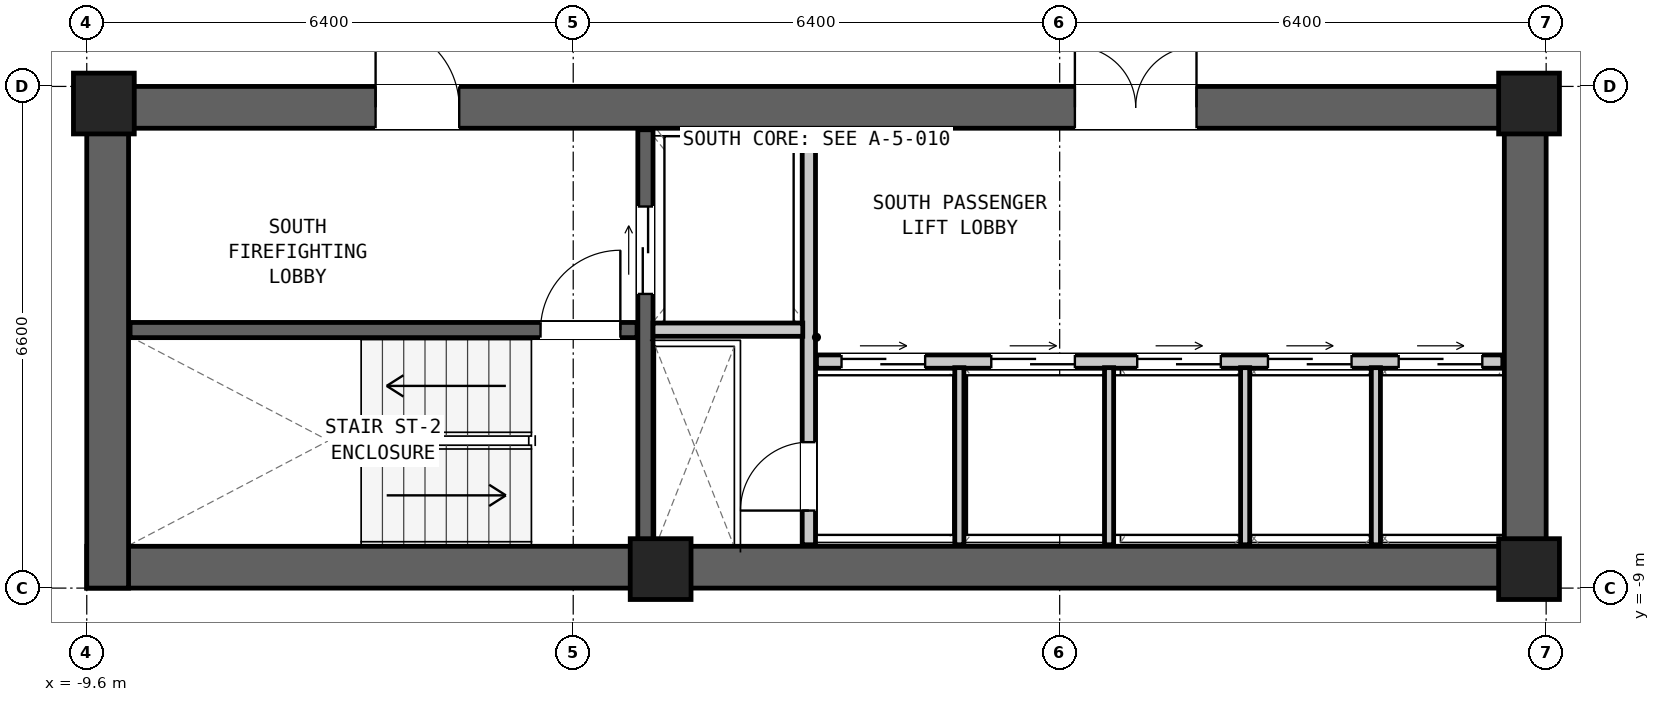
"""IFC4 building model, lengths in metres.
Left out: names, types, materials, properties, quantities, classifications, styles, units other than length and angle.
Written with IfcOpenShell. Run it as: python <this file> out.ifc"""

import sys

from ifc_helpers import new_model, si_unit, direction, frame, frame_2d, origin, origin_2d, place, context, subcontext, project, spatial, rectangle, extrude, element, fill, save


model = new_model("IFC4")
c1 = context("Model", 3, precision=1e-05, world=origin(), true_north=direction((0.0, 1.0)))
c2 = subcontext(c1, "Body", "Model", "MODEL_VIEW")
j1 = project(units=[si_unit("LENGTHUNIT", "METRE"), si_unit("PLANEANGLEUNIT", "RADIAN")], contexts=[c1])
p1 = place(None, origin())
s1 = spatial("IfcSite", under=j1, at=p1, CompositionType="ELEMENT")
p2 = place(p1, origin())
s2 = spatial("IfcBuilding", under=s1, at=p2, CompositionType="ELEMENT")
p3 = place(p2, frame((0.0, 0.0, 29.15)))
s3 = spatial("IfcBuildingStorey", under=s2, at=p3, CompositionType="ELEMENT", Elevation=29.15)
p4 = place(p3, frame((-9.6, -8.725, 0.0), z_axis=(0.0, 0.0, 1.0), x_axis=(1.0, 0.0, 0.0)))
e1 = element("IfcWall", 1, at=p4, inside=s3, PredefinedType="SHEAR", context=c2, shape_type="SweptSolid", body=[
    extrude(rectangle(XDim=19.2, YDim=0.55, at=frame_2d((9.6, 0.0))), origin(), (0.0, 0.0, 1.0), 3.05),
])
p5 = place(p3, frame((-9.6, -2.675, 0.0), z_axis=(0.0, 0.0, 1.0), x_axis=(1.0, 0.0, 0.0)))
e2 = element("IfcWall", 2, at=p5, inside=s3, PredefinedType="SHEAR", context=c2, shape_type="SweptSolid", body=[
    extrude(rectangle(XDim=19.2, YDim=0.55, at=frame_2d((9.6, 0.0))), origin(), (0.0, 0.0, 1.0), 3.05),
])
p6 = place(p5, frame((3.8, 0.0, 0.0)))
e3 = element("IfcOpeningElement", 3, at=p6, cuts=e2, PredefinedType="OPENING", context=c2, shape_type="SweptSolid", body=[
    extrude(rectangle(XDim=1.1, YDim=2.08, at=frame_2d((0.55, 1.04))), frame((0.0, 0.287, 0.0), z_axis=(0.0, -1.0, 0.0), x_axis=(1.0, 0.0, 0.0)), (0.0, 0.0, 1.0), 0.574),
])
p7 = place(p5, frame((13.0, 0.0, 0.0)))
e4 = element("IfcOpeningElement", 4, at=p7, cuts=e2, PredefinedType="OPENING", context=c2, shape_type="SweptSolid", body=[
    extrude(rectangle(XDim=1.6, YDim=2.12, at=frame_2d((0.8, 1.06))), frame((0.0, 0.287, 0.0), z_axis=(0.0, -1.0, 0.0), x_axis=(1.0, 0.0, 0.0)), (0.0, 0.0, 1.0), 0.574),
])
for number, where, z_axis, x_axis in (
    (5, (-9.325, -9.0, 0.0), (0.0, 0.0, 1.0), (0.0, 1.0, 0.0)),
    (6, (9.325, -9.0, 0.0), (0.0, 0.0, 1.0), (0.0, 1.0, 0.0)),
):
    element("IfcWall", number, at=place(p3, frame(where, z_axis=z_axis, x_axis=x_axis)), inside=s3, PredefinedType="SHEAR", context=c2, shape_type="SweptSolid", body=[
        extrude(rectangle(XDim=6.6, YDim=0.55, at=frame_2d((3.3, 0.0))), origin(), (0.0, 0.0, 1.0), 3.05),
    ])
for number, where, z_axis, x_axis in (
    (7, (-9.375, -2.625, 0.0), (0.0, 0.0, 1.0), (1.0, 0.0, 0.0)),
    (8, (9.375, -2.625, 0.0), (0.0, 0.0, 1.0), (1.0, 0.0, 0.0)),
    (9, (-2.05, -8.75, 0.0), (0.0, 0.0, 1.0), (1.0, 0.0, 0.0)),
    (10, (9.375, -8.75, 0.0), (0.0, 0.0, 1.0), (1.0, 0.0, 0.0)),
):
    element("IfcColumn", number, at=place(p3, frame(where, z_axis=z_axis, x_axis=x_axis)), inside=s3, PredefinedType="COLUMN", context=c2, shape_type="SweptSolid", body=[
        extrude(rectangle(XDim=0.8, YDim=0.8, at=origin_2d()), origin(), (0.0, 0.0, 1.0), 3.05),
    ])
p8 = place(p3, frame((-9.03, -5.605, 0.0), z_axis=(0.0, 0.0, 1.0), x_axis=(1.0, 0.0, 0.0)))
e11 = element("IfcWall", 11, at=p8, inside=s3, PredefinedType="SHEAR", context=c2, shape_type="SweptSolid", body=[
    extrude(rectangle(XDim=6.67, YDim=0.2, at=frame_2d((3.335, 0.0))), origin(), (0.0, 0.0, 1.0), 2.83),
])
p9 = place(p8, frame((5.4, 0.0, 0.0)))
e12 = element("IfcOpeningElement", 12, at=p9, cuts=e11, PredefinedType="OPENING", context=c2, shape_type="SweptSolid", body=[
    extrude(rectangle(XDim=1.05, YDim=2.08, at=frame_2d((0.525, 1.04))), frame((0.0, 0.112, 0.0), z_axis=(0.0, -1.0, 0.0), x_axis=(1.0, 0.0, 0.0)), (0.0, 0.0, 1.0), 0.224),
])
p10 = place(p3, frame((-2.25, -8.43, 0.0), z_axis=(0.0, 0.0, 1.0), x_axis=(0.0, 1.0, 0.0)))
e13 = element("IfcWall", 13, at=p10, inside=s3, PredefinedType="SHEAR", context=c2, shape_type="SweptSolid", body=[
    extrude(rectangle(XDim=5.46, YDim=0.2, at=frame_2d((2.73, 0.0))), origin(), (0.0, 0.0, 1.0), 2.83),
])
p11 = place(p10, frame((3.3, 0.0, 0.0)))
e14 = element("IfcOpeningElement", 14, at=p11, cuts=e13, PredefinedType="OPENING", context=c2, shape_type="SweptSolid", body=[
    extrude(rectangle(XDim=1.15, YDim=2.08, at=frame_2d((0.575, 1.04))), frame((0.0, 0.112, 0.0), z_axis=(0.0, -1.0, 0.0), x_axis=(1.0, 0.0, 0.0)), (0.0, 0.0, 1.0), 0.224),
])
p12 = place(p3, frame((-0.1, -8.43, 0.0), z_axis=(0.0, 0.0, 1.0), x_axis=(0.0, 1.0, 0.0)))
e15 = element("IfcWall", 15, at=p12, inside=s3, PredefinedType="PARTITIONING", context=c2, shape_type="SweptSolid", body=[
    extrude(rectangle(XDim=5.46, YDim=0.175, at=frame_2d((2.73, 0.0))), origin(), (0.0, 0.0, 1.0), 2.83),
])
p13 = place(p12, frame((0.45, 0.0, 0.0)))
e16 = element("IfcOpeningElement", 16, at=p13, cuts=e15, PredefinedType="OPENING", context=c2, shape_type="SweptSolid", body=[
    extrude(rectangle(XDim=0.9, YDim=2.05, at=frame_2d((0.45, 1.025))), frame((0.0, 0.1, 0.0), z_axis=(0.0, -1.0, 0.0), x_axis=(1.0, 0.0, 0.0)), (0.0, 0.0, 1.0), 0.199),
])
p14 = place(p3, frame((-2.15, -5.6, 0.0), z_axis=(0.0, 0.0, 1.0), x_axis=(1.0, 0.0, 0.0)))
e17 = element("IfcWall", 17, at=p14, inside=s3, PredefinedType="PARTITIONING", context=c2, shape_type="SweptSolid", body=[
    extrude(rectangle(XDim=1.97, YDim=0.175, at=frame_2d((0.985, 0.0))), origin(), (0.0, 0.0, 1.0), 2.83),
])
p15 = place(p3, frame((0.0, -6.02, 0.0), z_axis=(0.0, 0.0, 1.0), x_axis=(1.0, 0.0, 0.0)))
e18 = element("IfcWall", 18, at=p15, inside=s3, PredefinedType="PARTITIONING", context=c2, shape_type="SweptSolid", body=[
    extrude(rectangle(XDim=9.03, YDim=0.175, at=frame_2d((4.515, 0.0))), origin(), (0.0, 0.0, 1.0), 2.83),
])
p16 = place(p15, frame((0.33, 0.0, 0.0)))
e19 = element("IfcOpeningElement", 19, at=p16, cuts=e18, PredefinedType="OPENING", context=c2, shape_type="SweptSolid", body=[
    extrude(rectangle(XDim=1.1, YDim=2.06, at=frame_2d((0.55, 1.03))), frame((0.0, 0.1, 0.0), z_axis=(0.0, -1.0, 0.0), x_axis=(1.0, 0.0, 0.0)), (0.0, 0.0, 1.0), 0.199),
])
p17 = place(p15, frame((2.3, 0.0, 0.0)))
e20 = element("IfcOpeningElement", 20, at=p17, cuts=e18, PredefinedType="OPENING", context=c2, shape_type="SweptSolid", body=[
    extrude(rectangle(XDim=1.1, YDim=2.06, at=frame_2d((0.55, 1.03))), frame((0.0, 0.1, 0.0), z_axis=(0.0, -1.0, 0.0), x_axis=(1.0, 0.0, 0.0)), (0.0, 0.0, 1.0), 0.199),
])
p18 = place(p15, frame((4.22, 0.0, 0.0)))
e21 = element("IfcOpeningElement", 21, at=p18, cuts=e18, PredefinedType="OPENING", context=c2, shape_type="SweptSolid", body=[
    extrude(rectangle(XDim=1.1, YDim=2.06, at=frame_2d((0.55, 1.03))), frame((0.0, 0.1, 0.0), z_axis=(0.0, -1.0, 0.0), x_axis=(1.0, 0.0, 0.0)), (0.0, 0.0, 1.0), 0.199),
])
p19 = place(p15, frame((5.94, 0.0, 0.0)))
e22 = element("IfcOpeningElement", 22, at=p19, cuts=e18, PredefinedType="OPENING", context=c2, shape_type="SweptSolid", body=[
    extrude(rectangle(XDim=1.1, YDim=2.06, at=frame_2d((0.55, 1.03))), frame((0.0, 0.1, 0.0), z_axis=(0.0, -1.0, 0.0), x_axis=(1.0, 0.0, 0.0)), (0.0, 0.0, 1.0), 0.199),
])
p20 = place(p15, frame((7.66, 0.0, 0.0)))
e23 = element("IfcOpeningElement", 23, at=p20, cuts=e18, PredefinedType="OPENING", context=c2, shape_type="SweptSolid", body=[
    extrude(rectangle(XDim=1.1, YDim=2.06, at=frame_2d((0.55, 1.03))), frame((0.0, 0.1, 0.0), z_axis=(0.0, -1.0, 0.0), x_axis=(1.0, 0.0, 0.0)), (0.0, 0.0, 1.0), 0.199),
])
for number, where, z_axis, x_axis in (
    (24, (1.88, -8.43, 0.0), (0.0, 0.0, 1.0), (0.0, 1.0, 0.0)),
    (25, (3.85, -8.43, 0.0), (0.0, 0.0, 1.0), (0.0, 1.0, 0.0)),
    (26, (5.64, -8.43, 0.0), (0.0, 0.0, 1.0), (0.0, 1.0, 0.0)),
    (27, (7.36, -8.43, 0.0), (0.0, 0.0, 1.0), (0.0, 1.0, 0.0)),
):
    element("IfcWall", number, at=place(p3, frame(where, z_axis=z_axis, x_axis=x_axis)), inside=s3, PredefinedType="PARTITIONING", context=c2, shape_type="SweptSolid", body=[
        extrude(rectangle(XDim=2.33, YDim=0.12, at=frame_2d((1.165, 0.0))), origin(), (0.0, 0.0, 1.0), 2.83),
    ])
p21 = place(p9, origin())
e28 = element("IfcDoor", 28, at=p21, inside=s3, OperationType="SINGLE_SWING_RIGHT", PredefinedType="DOOR", context=c2, shape_type="SweptSolid", body=[
    extrude(rectangle(XDim=1.05, YDim=2.08, at=frame_2d((0.525, 1.04))), frame((0.0, 0.025, 0.0), z_axis=(0.0, -1.0, 0.0), x_axis=(1.0, 0.0, 0.0)), (0.0, 0.0, 1.0), 0.05),
])
fill(e12, e28)
p22 = place(p6, origin())
e29 = element("IfcDoor", 29, at=p22, inside=s3, OperationType="SINGLE_SWING_LEFT", PredefinedType="DOOR", context=c2, shape_type="SweptSolid", body=[
    extrude(rectangle(XDim=1.1, YDim=2.08, at=frame_2d((0.55, 1.04))), frame((0.0, 0.025, 0.0), z_axis=(0.0, -1.0, 0.0), x_axis=(1.0, 0.0, 0.0)), (0.0, 0.0, 1.0), 0.05),
])
fill(e3, e29)
p23 = place(p11, origin())
e30 = element("IfcDoor", 30, at=p23, inside=s3, OperationType="DOUBLE_DOOR_SLIDING", PredefinedType="DOOR", context=c2, shape_type="SweptSolid", body=[
    extrude(rectangle(XDim=1.15, YDim=2.08, at=frame_2d((0.575, 1.04))), frame((0.0, 0.025, 0.0), z_axis=(0.0, -1.0, 0.0), x_axis=(1.0, 0.0, 0.0)), (0.0, 0.0, 1.0), 0.05),
])
fill(e14, e30)
p24 = place(p13, origin())
e31 = element("IfcDoor", 31, at=p24, inside=s3, OperationType="SINGLE_SWING_LEFT", PredefinedType="DOOR", context=c2, shape_type="SweptSolid", body=[
    extrude(rectangle(XDim=0.9, YDim=2.05, at=frame_2d((0.45, 1.025))), frame((0.0, 0.025, 0.0), z_axis=(0.0, -1.0, 0.0), x_axis=(1.0, 0.0, 0.0)), (0.0, 0.0, 1.0), 0.05),
])
fill(e16, e31)
p25 = place(p7, origin())
e32 = element("IfcDoor", 32, at=p25, inside=s3, OperationType="DOUBLE_DOOR_SINGLE_SWING", PredefinedType="DOOR", context=c2, shape_type="SweptSolid", body=[
    extrude(rectangle(XDim=1.6, YDim=2.12, at=frame_2d((0.8, 1.06))), frame((0.0, 0.025, 0.0), z_axis=(0.0, -1.0, 0.0), x_axis=(1.0, 0.0, 0.0)), (0.0, 0.0, 1.0), 0.05),
])
fill(e4, e32)
p26 = place(p16, origin())
e33 = element("IfcDoor", 33, at=p26, inside=s3, OperationType="DOUBLE_DOOR_SLIDING", PredefinedType="DOOR", context=c2, shape_type="SweptSolid", body=[
    extrude(rectangle(XDim=1.1, YDim=2.06, at=frame_2d((0.55, 1.03))), frame((0.0, 0.025, 0.0), z_axis=(0.0, -1.0, 0.0), x_axis=(1.0, 0.0, 0.0)), (0.0, 0.0, 1.0), 0.05),
])
fill(e19, e33)
p27 = place(p17, origin())
e34 = element("IfcDoor", 34, at=p27, inside=s3, OperationType="DOUBLE_DOOR_SLIDING", PredefinedType="DOOR", context=c2, shape_type="SweptSolid", body=[
    extrude(rectangle(XDim=1.1, YDim=2.06, at=frame_2d((0.55, 1.03))), frame((0.0, 0.025, 0.0), z_axis=(0.0, -1.0, 0.0), x_axis=(1.0, 0.0, 0.0)), (0.0, 0.0, 1.0), 0.05),
])
fill(e20, e34)
p28 = place(p18, origin())
e35 = element("IfcDoor", 35, at=p28, inside=s3, OperationType="DOUBLE_DOOR_SLIDING", PredefinedType="DOOR", context=c2, shape_type="SweptSolid", body=[
    extrude(rectangle(XDim=1.1, YDim=2.06, at=frame_2d((0.55, 1.03))), frame((0.0, 0.025, 0.0), z_axis=(0.0, -1.0, 0.0), x_axis=(1.0, 0.0, 0.0)), (0.0, 0.0, 1.0), 0.05),
])
fill(e21, e35)
p29 = place(p19, origin())
e36 = element("IfcDoor", 36, at=p29, inside=s3, OperationType="DOUBLE_DOOR_SLIDING", PredefinedType="DOOR", context=c2, shape_type="SweptSolid", body=[
    extrude(rectangle(XDim=1.1, YDim=2.06, at=frame_2d((0.55, 1.03))), frame((0.0, 0.025, 0.0), z_axis=(0.0, -1.0, 0.0), x_axis=(1.0, 0.0, 0.0)), (0.0, 0.0, 1.0), 0.05),
])
fill(e22, e36)
p30 = place(p20, origin())
e37 = element("IfcDoor", 37, at=p30, inside=s3, OperationType="DOUBLE_DOOR_SLIDING", PredefinedType="DOOR", context=c2, shape_type="SweptSolid", body=[
    extrude(rectangle(XDim=1.1, YDim=2.06, at=frame_2d((0.55, 1.03))), frame((0.0, 0.025, 0.0), z_axis=(0.0, -1.0, 0.0), x_axis=(1.0, 0.0, 0.0)), (0.0, 0.0, 1.0), 0.05),
])
fill(e23, e37)
save(model, sys.argv[1])
